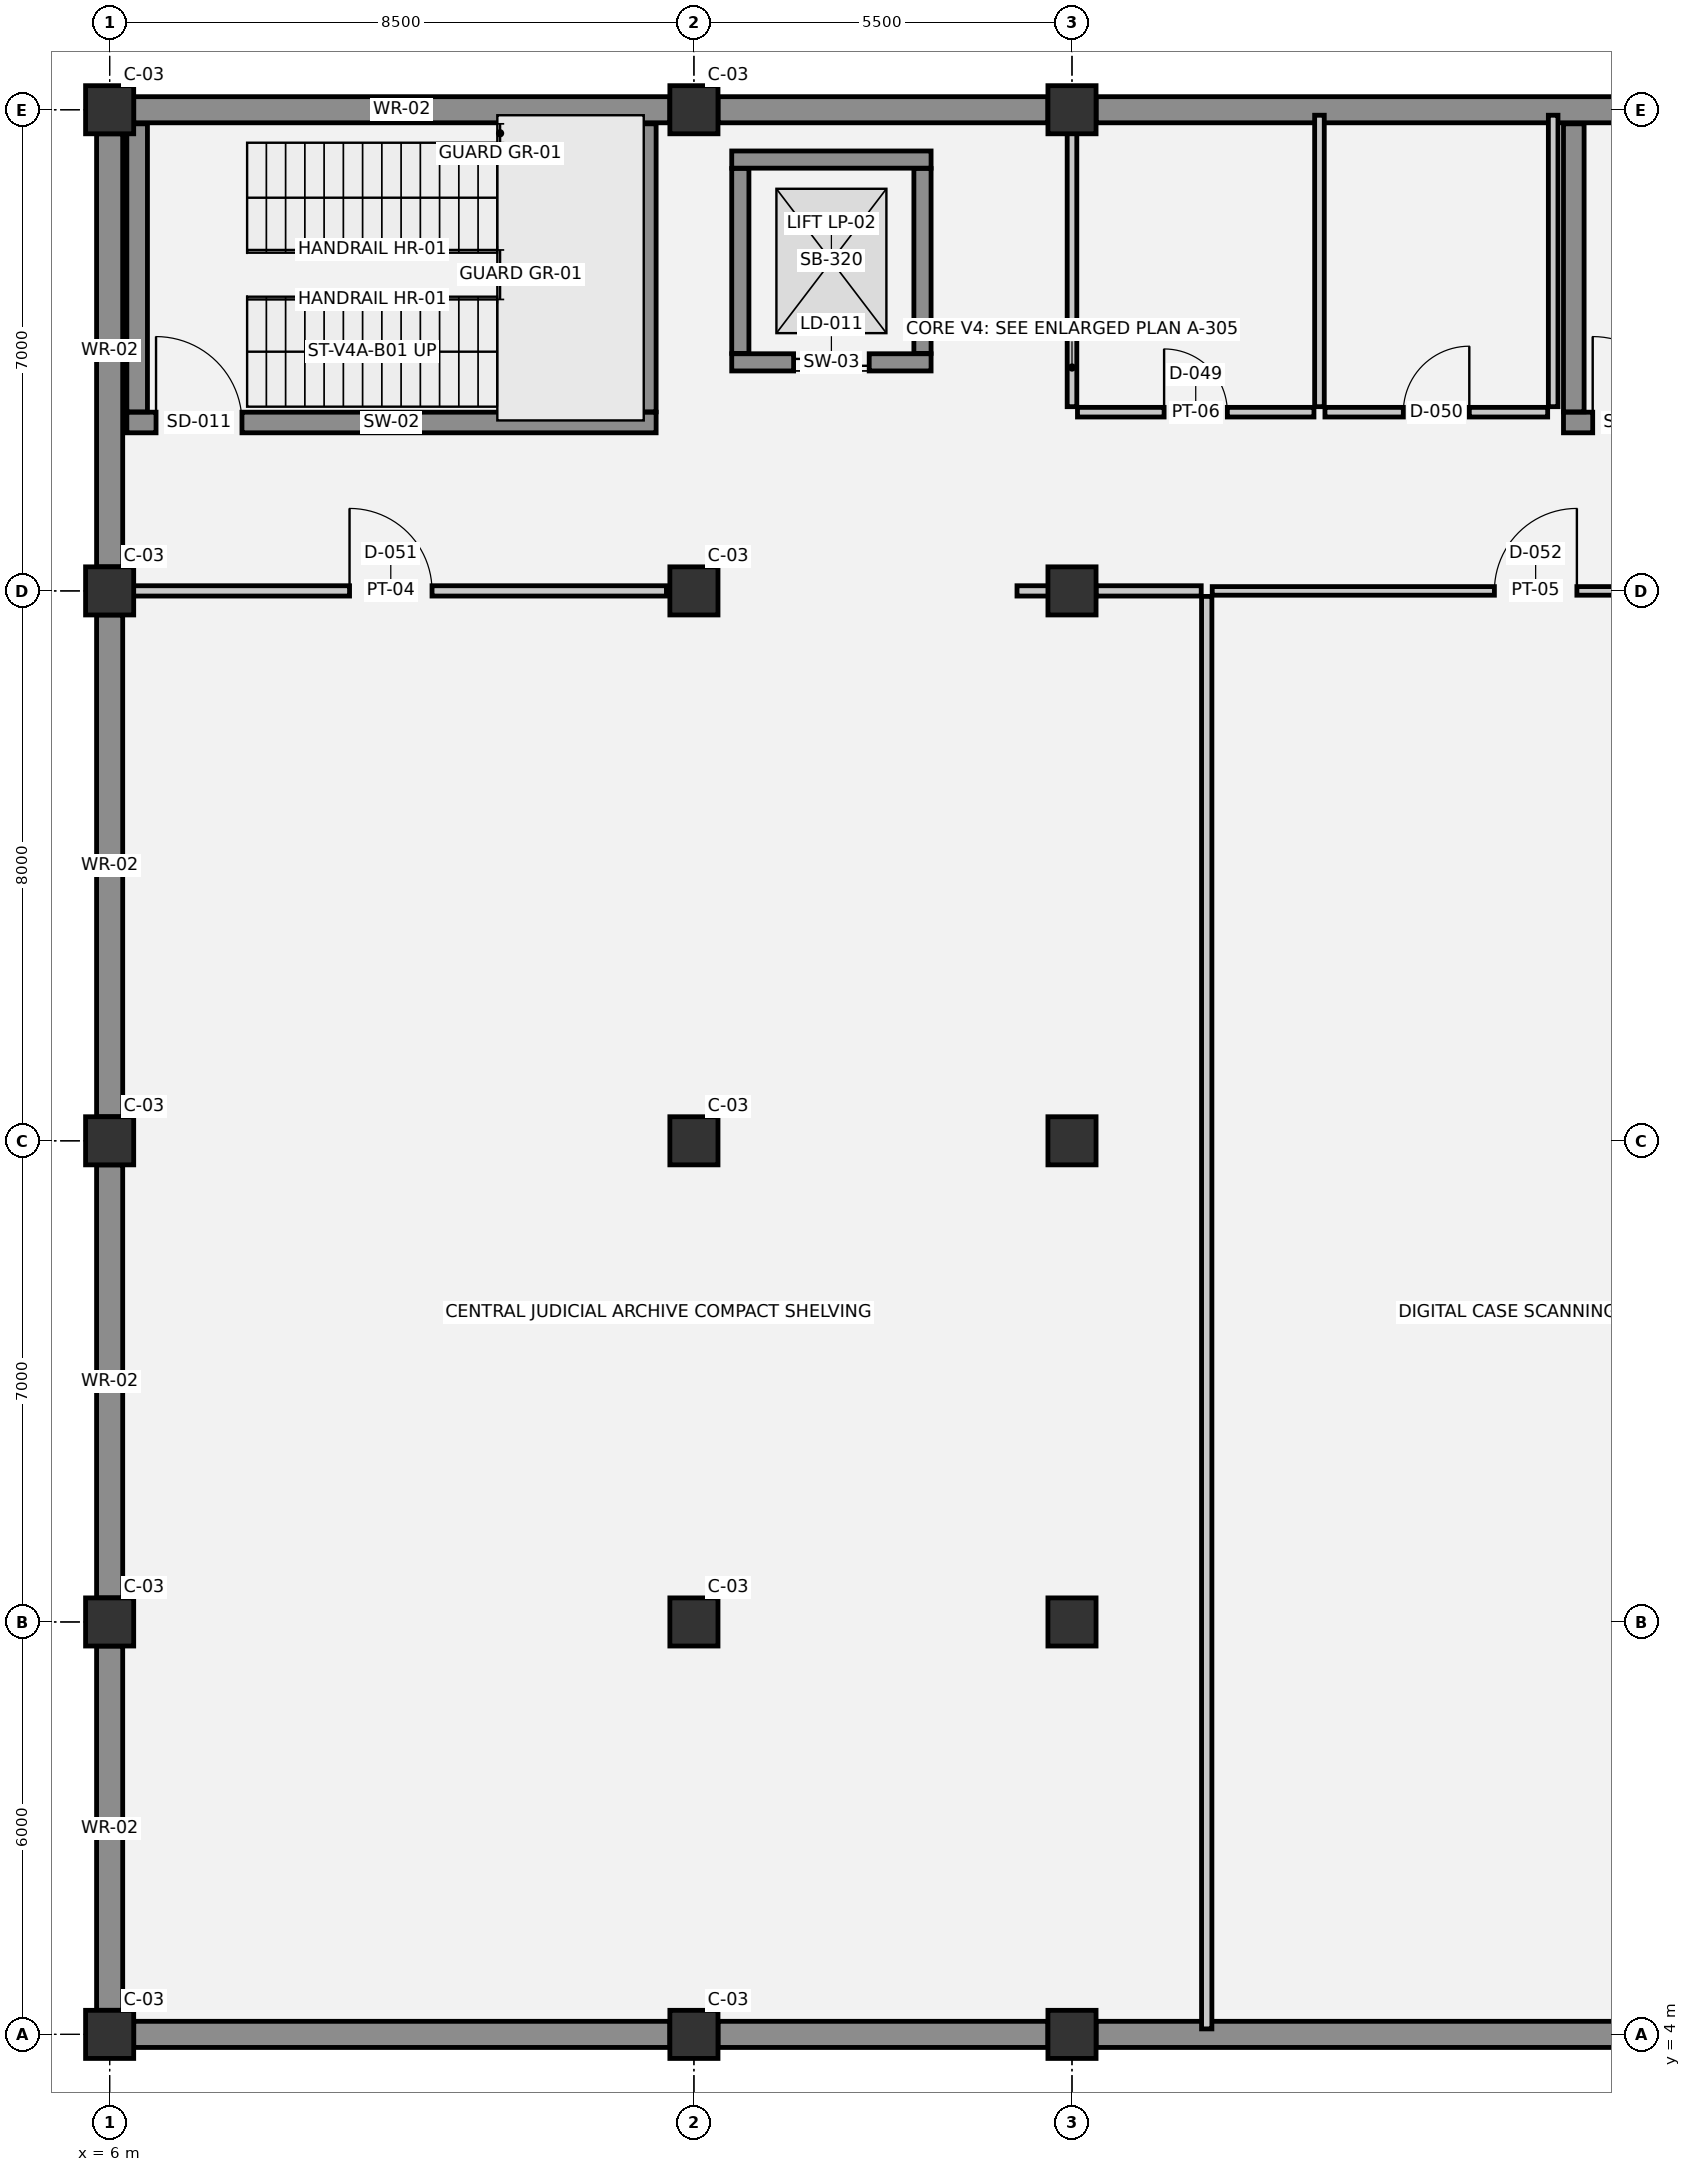
"""IFC4 building model, lengths in metres.
Left out: names, types, materials, properties, quantities, classifications, styles, units other than length and angle.
Written with IfcOpenShell. Run it as: python <this file> out.ifc"""

import sys

from ifc_helpers import new_model, si_unit, direction, frame, frame_2d, origin, origin_2d, place, context, subcontext, project, spatial, rectangle, extrude, element, fill, save


model = new_model("IFC4")
c1 = context("Model", 3, precision=1e-05, world=origin(), true_north=direction((0.0, 1.0)))
c2 = subcontext(c1, "Body", "Model", "MODEL_VIEW")
j1 = project(units=[si_unit("LENGTHUNIT", "METRE"), si_unit("PLANEANGLEUNIT", "RADIAN")], contexts=[c1])
p1 = place(None, origin())
s1 = spatial("IfcSite", under=j1, at=p1, CompositionType="ELEMENT")
p2 = place(p1, origin())
s2 = spatial("IfcBuilding", under=s1, at=p2, CompositionType="ELEMENT")
p3 = place(p2, frame((0.0, 0.0, -4.5)))
s3 = spatial("IfcBuildingStorey", under=s2, at=p3, CompositionType="ELEMENT", Elevation=-4.5)
for number, where, z_axis, x_axis in (
    (1, (6.0, 4.0, 0.0), (0.0, 0.0, 1.0), (1.0, 0.0, 0.0)),
    (2, (6.0, 10.0, 0.0), (0.0, 0.0, 1.0), (1.0, 0.0, 0.0)),
    (3, (6.0, 17.0, 0.0), (0.0, 0.0, 1.0), (1.0, 0.0, 0.0)),
    (4, (6.0, 25.0, 0.0), (0.0, 0.0, 1.0), (1.0, 0.0, 0.0)),
    (5, (6.0, 32.0, 0.0), (0.0, 0.0, 1.0), (1.0, 0.0, 0.0)),
    (6, (14.5, 4.0, 0.0), (0.0, 0.0, 1.0), (1.0, 0.0, 0.0)),
    (7, (14.5, 10.0, 0.0), (0.0, 0.0, 1.0), (1.0, 0.0, 0.0)),
    (8, (14.5, 17.0, 0.0), (0.0, 0.0, 1.0), (1.0, 0.0, 0.0)),
    (9, (14.5, 25.0, 0.0), (0.0, 0.0, 1.0), (1.0, 0.0, 0.0)),
    (10, (14.5, 32.0, 0.0), (0.0, 0.0, 1.0), (1.0, 0.0, 0.0)),
    (11, (20.0, 4.0, 0.0), (0.0, 0.0, 1.0), (1.0, 0.0, 0.0)),
    (12, (20.0, 10.0, 0.0), (0.0, 0.0, 1.0), (1.0, 0.0, 0.0)),
    (13, (20.0, 17.0, 0.0), (0.0, 0.0, 1.0), (1.0, 0.0, 0.0)),
    (14, (20.0, 25.0, 0.0), (0.0, 0.0, 1.0), (1.0, 0.0, 0.0)),
    (15, (20.0, 32.0, 0.0), (0.0, 0.0, 1.0), (1.0, 0.0, 0.0)),
):
    element("IfcColumn", number, at=place(p3, frame(where, z_axis=z_axis, x_axis=x_axis)), inside=s3, PredefinedType="COLUMN", context=c2, shape_type="SweptSolid", body=[
        extrude(rectangle(XDim=0.7, YDim=0.7, at=origin_2d()), origin(), (0.0, 0.0, 1.0), 4.5),
    ])
p4 = place(p3, frame((6.0, 4.35, 0.0), z_axis=(0.0, 0.0, 1.0), x_axis=(0.0, 1.0, 0.0)))
e16 = element("IfcWall", 16, at=p4, inside=s3, PredefinedType="STANDARD", context=c2, shape_type="SweptSolid", body=[
    extrude(rectangle(XDim=5.3, YDim=0.38, at=frame_2d((2.65, 0.0))), origin(), (0.0, 0.0, 1.0), 4.24),
])
p5 = place(p3, frame((6.0, 10.35, 0.0), z_axis=(0.0, 0.0, 1.0), x_axis=(0.0, 1.0, 0.0)))
e17 = element("IfcWall", 17, at=p5, inside=s3, PredefinedType="STANDARD", context=c2, shape_type="SweptSolid", body=[
    extrude(rectangle(XDim=6.3, YDim=0.38, at=frame_2d((3.15, 0.0))), origin(), (0.0, 0.0, 1.0), 4.24),
])
p6 = place(p3, frame((6.0, 17.35, 0.0), z_axis=(0.0, 0.0, 1.0), x_axis=(0.0, 1.0, 0.0)))
e18 = element("IfcWall", 18, at=p6, inside=s3, PredefinedType="STANDARD", context=c2, shape_type="SweptSolid", body=[
    extrude(rectangle(XDim=7.3, YDim=0.38, at=frame_2d((3.65, 0.0))), origin(), (0.0, 0.0, 1.0), 4.24),
])
p7 = place(p3, frame((6.0, 25.35, 0.0), z_axis=(0.0, 0.0, 1.0), x_axis=(0.0, 1.0, 0.0)))
e19 = element("IfcWall", 19, at=p7, inside=s3, PredefinedType="STANDARD", context=c2, shape_type="SweptSolid", body=[
    extrude(rectangle(XDim=6.3, YDim=0.38, at=frame_2d((3.15, 0.0))), origin(), (0.0, 0.0, 1.0), 4.24),
])
p8 = place(p3, frame((6.35, 32.0, 0.0), z_axis=(0.0, 0.0, 1.0), x_axis=(1.0, 0.0, 0.0)))
e20 = element("IfcWall", 20, at=p8, inside=s3, PredefinedType="STANDARD", context=c2, shape_type="SweptSolid", body=[
    extrude(rectangle(XDim=7.8, YDim=0.38, at=frame_2d((3.9, 0.0))), origin(), (0.0, 0.0, 1.0), 4.24),
])
p9 = place(p3, frame((14.85, 32.0, 0.0), z_axis=(0.0, 0.0, 1.0), x_axis=(1.0, 0.0, 0.0)))
e21 = element("IfcWall", 21, at=p9, inside=s3, PredefinedType="STANDARD", context=c2, shape_type="SweptSolid", body=[
    extrude(rectangle(XDim=4.8, YDim=0.38, at=frame_2d((2.4, 0.0))), origin(), (0.0, 0.0, 1.0), 4.24),
])
for number, where, z_axis, x_axis in (
    (22, (20.35, 32.0, 0.0), (0.0, 0.0, 1.0), (1.0, 0.0, 0.0)),
    (23, (34.65, 4.0, 0.0), (0.0, 0.0, 1.0), (-1.0, 0.0, 0.0)),
):
    element("IfcWall", number, at=place(p3, frame(where, z_axis=z_axis, x_axis=x_axis)), inside=s3, PredefinedType="STANDARD", context=c2, shape_type="SweptSolid", body=[
        extrude(rectangle(XDim=14.3, YDim=0.38, at=frame_2d((7.15, 0.0))), origin(), (0.0, 0.0, 1.0), 4.24),
    ])
p10 = place(p3, frame((19.65, 4.0, 0.0), z_axis=(0.0, 0.0, 1.0), x_axis=(-1.0, 0.0, 0.0)))
e24 = element("IfcWall", 24, at=p10, inside=s3, PredefinedType="STANDARD", context=c2, shape_type="SweptSolid", body=[
    extrude(rectangle(XDim=4.8, YDim=0.38, at=frame_2d((2.4, 0.0))), origin(), (0.0, 0.0, 1.0), 4.24),
])
p11 = place(p3, frame((14.15, 4.0, 0.0), z_axis=(0.0, 0.0, 1.0), x_axis=(-1.0, 0.0, 0.0)))
e25 = element("IfcWall", 25, at=p11, inside=s3, PredefinedType="STANDARD", context=c2, shape_type="SweptSolid", body=[
    extrude(rectangle(XDim=7.8, YDim=0.38, at=frame_2d((3.9, 0.0))), origin(), (0.0, 0.0, 1.0), 4.24),
])
p12 = place(p3, frame((15.05, 28.325, 0.0), z_axis=(0.0, 0.0, 1.0), x_axis=(1.0, 0.0, 0.0)))
e26 = element("IfcWall", 26, at=p12, inside=s3, PredefinedType="SHEAR", context=c2, shape_type="SweptSolid", body=[
    extrude(rectangle(XDim=2.9, YDim=0.25, at=frame_2d((1.45, 0.0))), origin(), (0.0, 0.0, 1.0), 4.5),
])
p13 = place(p12, frame((0.9, 0.0, 0.0)))
e27 = element("IfcOpeningElement", 27, at=p13, cuts=e26, PredefinedType="OPENING", context=c2, shape_type="SweptSolid", body=[
    extrude(rectangle(XDim=1.1, YDim=2.15, at=frame_2d((0.55, 1.075))), frame((0.0, 0.135, 0.0), z_axis=(0.0, -1.0, 0.0), x_axis=(1.0, 0.0, 0.0)), (0.0, 0.0, 1.0), 0.27),
])
p14 = place(p3, frame((17.95, 31.275, 0.0), z_axis=(0.0, 0.0, 1.0), x_axis=(-1.0, 0.0, 0.0)))
e28 = element("IfcWall", 28, at=p14, inside=s3, PredefinedType="SHEAR", context=c2, shape_type="SweptSolid", body=[
    extrude(rectangle(XDim=2.9, YDim=0.25, at=frame_2d((1.45, 0.0))), origin(), (0.0, 0.0, 1.0), 4.5),
])
for number, where, z_axis, x_axis in (
    (29, (15.175, 31.145, 0.0), (0.0, 0.0, 1.0), (0.0, -1.0, 0.0)),
    (30, (17.825, 28.455, 0.0), (0.0, 0.0, 1.0), (0.0, 1.0, 0.0)),
):
    element("IfcWall", number, at=place(p3, frame(where, z_axis=z_axis, x_axis=x_axis)), inside=s3, PredefinedType="SHEAR", context=c2, shape_type="SweptSolid", body=[
        extrude(rectangle(XDim=2.69, YDim=0.25, at=frame_2d((1.345, 0.0))), origin(), (0.0, 0.0, 1.0), 4.5),
    ])
p15 = place(p3, frame((6.25, 27.45, 0.0), z_axis=(0.0, 0.0, 1.0), x_axis=(1.0, 0.0, 0.0)))
e31 = element("IfcWall", 31, at=p15, inside=s3, PredefinedType="SHEAR", context=c2, shape_type="SweptSolid", body=[
    extrude(rectangle(XDim=7.7, YDim=0.3, at=frame_2d((3.85, 0.0))), origin(), (0.0, 0.0, 1.0), 4.24),
])
p16 = place(p15, frame((0.425, 0.0, 0.0)))
e32 = element("IfcOpeningElement", 32, at=p16, cuts=e31, PredefinedType="OPENING", context=c2, shape_type="SweptSolid", body=[
    extrude(rectangle(XDim=1.25, YDim=2.15, at=frame_2d((0.625, 1.075))), frame((0.0, 0.16, 0.0), z_axis=(0.0, -1.0, 0.0), x_axis=(1.0, 0.0, 0.0)), (0.0, 0.0, 1.0), 0.32),
])
for number, where, z_axis, x_axis in (
    (33, (6.4, 31.795, 0.0), (0.0, 0.0, 1.0), (0.0, -1.0, 0.0)),
    (34, (13.8, 27.605, 0.0), (0.0, 0.0, 1.0), (0.0, 1.0, 0.0)),
):
    element("IfcWall", number, at=place(p3, frame(where, z_axis=z_axis, x_axis=x_axis)), inside=s3, PredefinedType="SHEAR", context=c2, shape_type="SweptSolid", body=[
        extrude(rectangle(XDim=4.19, YDim=0.3, at=frame_2d((2.095, 0.0))), origin(), (0.0, 0.0, 1.0), 4.24),
    ])
p17 = place(p3, frame((27.15, 27.45, 0.0), z_axis=(0.0, 0.0, 1.0), x_axis=(1.0, 0.0, 0.0)))
e35 = element("IfcWall", 35, at=p17, inside=s3, PredefinedType="SHEAR", context=c2, shape_type="SweptSolid", body=[
    extrude(rectangle(XDim=7.7, YDim=0.3, at=frame_2d((3.85, 0.0))), origin(), (0.0, 0.0, 1.0), 4.24),
])
p18 = place(p17, frame((0.425, 0.0, 0.0)))
e36 = element("IfcOpeningElement", 36, at=p18, cuts=e35, PredefinedType="OPENING", context=c2, shape_type="SweptSolid", body=[
    extrude(rectangle(XDim=1.25, YDim=2.15, at=frame_2d((0.625, 1.075))), frame((0.0, 0.16, 0.0), z_axis=(0.0, -1.0, 0.0), x_axis=(1.0, 0.0, 0.0)), (0.0, 0.0, 1.0), 0.32),
])
p19 = place(p3, frame((27.3, 31.795, 0.0), z_axis=(0.0, 0.0, 1.0), x_axis=(0.0, -1.0, 0.0)))
e37 = element("IfcWall", 37, at=p19, inside=s3, PredefinedType="SHEAR", context=c2, shape_type="SweptSolid", body=[
    extrude(rectangle(XDim=4.19, YDim=0.3, at=frame_2d((2.095, 0.0))), origin(), (0.0, 0.0, 1.0), 4.24),
])
p20 = place(p3, frame((6.08, 25.0, 0.0), z_axis=(0.0, 0.0, 1.0), x_axis=(1.0, 0.0, 0.0)))
e38 = element("IfcWall", 38, at=p20, inside=s3, PredefinedType="PARTITIONING", context=c2, shape_type="SweptSolid", body=[
    extrude(rectangle(XDim=8.02, YDim=0.15, at=frame_2d((4.01, 0.0))), origin(), (0.0, 0.0, 1.0), 3.53),
])
p21 = place(p20, frame((3.41, 0.0, 0.0)))
e39 = element("IfcOpeningElement", 39, at=p21, cuts=e38, PredefinedType="OPENING", context=c2, shape_type="SweptSolid", body=[
    extrude(rectangle(XDim=1.2, YDim=2.15, at=frame_2d((0.6, 1.075))), frame((0.0, 0.085, 0.0), z_axis=(0.0, -1.0, 0.0), x_axis=(1.0, 0.0, 0.0)), (0.0, 0.0, 1.0), 0.17),
])
p22 = place(p3, frame((19.2, 25.0, 0.0), z_axis=(0.0, 0.0, 1.0), x_axis=(1.0, 0.0, 0.0)))
e40 = element("IfcWall", 40, at=p22, inside=s3, PredefinedType="PARTITIONING", context=c2, shape_type="SweptSolid", body=[
    extrude(rectangle(XDim=1.15, YDim=0.15, at=frame_2d((0.575, 0.0))), origin(), (0.0, 0.0, 1.0), 4.14),
])
p23 = place(p3, frame((20.35, 25.0, 0.0), z_axis=(0.0, 0.0, 1.0), x_axis=(1.0, 0.0, 0.0)))
e41 = element("IfcWall", 41, at=p23, inside=s3, PredefinedType="PARTITIONING", context=c2, shape_type="SweptSolid", body=[
    extrude(rectangle(XDim=1.53, YDim=0.15, at=frame_2d((0.765, 0.0))), origin(), (0.0, 0.0, 1.0), 3.28),
])
p24 = place(p3, frame((22.04, 25.0, 0.0), z_axis=(0.0, 0.0, 1.0), x_axis=(1.0, 0.0, 0.0)))
e42 = element("IfcWall", 42, at=p24, inside=s3, PredefinedType="PARTITIONING", context=c2, shape_type="SweptSolid", body=[
    extrude(rectangle(XDim=9.41, YDim=0.125, at=frame_2d((4.705, 0.0))), origin(), (0.0, 0.0, 1.0), 3.28),
])
p25 = place(p24, frame((4.105, 0.0, 0.0)))
e43 = element("IfcOpeningElement", 43, at=p25, cuts=e42, PredefinedType="OPENING", context=c2, shape_type="SweptSolid", body=[
    extrude(rectangle(XDim=1.2, YDim=2.15, at=frame_2d((0.6, 1.075))), frame((0.0, 0.073, 0.0), z_axis=(0.0, -1.0, 0.0), x_axis=(1.0, 0.0, 0.0)), (0.0, 0.0, 1.0), 0.145),
])
p26 = place(p3, frame((20.08, 27.6, 0.0), z_axis=(0.0, 0.0, 1.0), x_axis=(1.0, 0.0, 0.0)))
e44 = element("IfcWall", 44, at=p26, inside=s3, PredefinedType="PLUMBINGWALL", context=c2, shape_type="SweptSolid", body=[
    extrude(rectangle(XDim=3.44, YDim=0.14, at=frame_2d((1.72, 0.0))), origin(), (0.0, 0.0, 1.0), 4.14),
])
p27 = place(p26, frame((1.26, 0.0, 0.0)))
e45 = element("IfcOpeningElement", 45, at=p27, cuts=e44, PredefinedType="OPENING", context=c2, shape_type="SweptSolid", body=[
    extrude(rectangle(XDim=0.92, YDim=2.1, at=frame_2d((0.46, 1.05))), frame((0.0, 0.08, 0.0), z_axis=(0.0, -1.0, 0.0), x_axis=(1.0, 0.0, 0.0)), (0.0, 0.0, 1.0), 0.16),
])
p28 = place(p3, frame((23.68, 27.6, 0.0), z_axis=(0.0, 0.0, 1.0), x_axis=(1.0, 0.0, 0.0)))
e46 = element("IfcWall", 46, at=p28, inside=s3, PredefinedType="PLUMBINGWALL", context=c2, shape_type="SweptSolid", body=[
    extrude(rectangle(XDim=3.24, YDim=0.14, at=frame_2d((1.62, 0.0))), origin(), (0.0, 0.0, 1.0), 4.14),
])
p29 = place(p28, frame((1.14, 0.0, 0.0)))
e47 = element("IfcOpeningElement", 47, at=p29, cuts=e46, PredefinedType="OPENING", context=c2, shape_type="SweptSolid", body=[
    extrude(rectangle(XDim=0.96, YDim=2.1, at=frame_2d((0.48, 1.05))), frame((0.0, 0.08, 0.0), z_axis=(0.0, -1.0, 0.0), x_axis=(1.0, 0.0, 0.0)), (0.0, 0.0, 1.0), 0.16),
])
p30 = place(p3, frame((20.0, 27.68, 0.0), z_axis=(0.0, 0.0, 1.0), x_axis=(0.0, 1.0, 0.0)))
e48 = element("IfcWall", 48, at=p30, inside=s3, PredefinedType="PLUMBINGWALL", context=c2, shape_type="SweptSolid", body=[
    extrude(rectangle(XDim=4.24, YDim=0.14, at=frame_2d((2.12, 0.0))), origin(), (0.0, 0.0, 1.0), 3.68),
])
p31 = place(p3, frame((21.96, 4.08, 0.0), z_axis=(0.0, 0.0, 1.0), x_axis=(0.0, 1.0, 0.0)))
e49 = element("IfcWall", 49, at=p31, inside=s3, PredefinedType="PARTITIONING", context=c2, shape_type="SweptSolid", body=[
    extrude(rectangle(XDim=20.84, YDim=0.15, at=frame_2d((10.42, 0.0))), origin(), (0.0, 0.0, 1.0), 4.14),
])
for number, where, z_axis, x_axis in (
    (50, (23.6, 27.68, 0.0), (0.0, 0.0, 1.0), (0.0, 1.0, 0.0)),
    (51, (27.0, 27.68, 0.0), (0.0, 0.0, 1.0), (0.0, 1.0, 0.0)),
):
    element("IfcWall", number, at=place(p3, frame(where, z_axis=z_axis, x_axis=x_axis)), inside=s3, PredefinedType="PLUMBINGWALL", context=c2, shape_type="SweptSolid", body=[
        extrude(rectangle(XDim=4.24, YDim=0.14, at=frame_2d((2.12, 0.0))), origin(), (0.0, 0.0, 1.0), 4.14),
    ])
p32 = place(p13, origin())
e52 = element("IfcDoor", 52, at=p32, inside=s3, OperationType="DOUBLE_DOOR_SLIDING", PredefinedType="DOOR", context=c2, shape_type="SweptSolid", body=[
    extrude(rectangle(XDim=1.1, YDim=2.15, at=frame_2d((0.55, 1.075))), frame((0.0, 0.025, 0.0), z_axis=(0.0, -1.0, 0.0), x_axis=(1.0, 0.0, 0.0)), (0.0, 0.0, 1.0), 0.05),
])
fill(e27, e52)
p33 = place(p16, origin())
e53 = element("IfcDoor", 53, at=p33, inside=s3, OperationType="SINGLE_SWING_LEFT", PredefinedType="DOOR", context=c2, shape_type="SweptSolid", body=[
    extrude(rectangle(XDim=1.25, YDim=2.15, at=frame_2d((0.625, 1.075))), frame((0.0, 0.025, 0.0), z_axis=(0.0, -1.0, 0.0), x_axis=(1.0, 0.0, 0.0)), (0.0, 0.0, 1.0), 0.05),
])
fill(e32, e53)
p34 = place(p18, origin())
e54 = element("IfcDoor", 54, at=p34, inside=s3, OperationType="SINGLE_SWING_LEFT", PredefinedType="DOOR", context=c2, shape_type="SweptSolid", body=[
    extrude(rectangle(XDim=1.25, YDim=2.15, at=frame_2d((0.625, 1.075))), frame((0.0, 0.025, 0.0), z_axis=(0.0, -1.0, 0.0), x_axis=(1.0, 0.0, 0.0)), (0.0, 0.0, 1.0), 0.05),
])
fill(e36, e54)
p35 = place(p27, origin())
e55 = element("IfcDoor", 55, at=p35, inside=s3, OperationType="SINGLE_SWING_LEFT", PredefinedType="DOOR", context=c2, shape_type="SweptSolid", body=[
    extrude(rectangle(XDim=0.92, YDim=2.1, at=frame_2d((0.46, 1.05))), frame((0.0, 0.025, 0.0), z_axis=(0.0, -1.0, 0.0), x_axis=(1.0, 0.0, 0.0)), (0.0, 0.0, 1.0), 0.05),
])
fill(e45, e55)
p36 = place(p29, origin())
e56 = element("IfcDoor", 56, at=p36, inside=s3, OperationType="SINGLE_SWING_RIGHT", PredefinedType="DOOR", context=c2, shape_type="SweptSolid", body=[
    extrude(rectangle(XDim=0.96, YDim=2.1, at=frame_2d((0.48, 1.05))), frame((0.0, 0.025, 0.0), z_axis=(0.0, -1.0, 0.0), x_axis=(1.0, 0.0, 0.0)), (0.0, 0.0, 1.0), 0.05),
])
fill(e47, e56)
p37 = place(p21, origin())
e57 = element("IfcDoor", 57, at=p37, inside=s3, OperationType="SINGLE_SWING_LEFT", PredefinedType="DOOR", context=c2, shape_type="SweptSolid", body=[
    extrude(rectangle(XDim=1.2, YDim=2.15, at=frame_2d((0.6, 1.075))), frame((0.0, 0.025, 0.0), z_axis=(0.0, -1.0, 0.0), x_axis=(1.0, 0.0, 0.0)), (0.0, 0.0, 1.0), 0.05),
])
fill(e39, e57)
p38 = place(p25, origin())
e58 = element("IfcDoor", 58, at=p38, inside=s3, OperationType="SINGLE_SWING_RIGHT", PredefinedType="DOOR", context=c2, shape_type="SweptSolid", body=[
    extrude(rectangle(XDim=1.2, YDim=2.15, at=frame_2d((0.6, 1.075))), frame((0.0, 0.025, 0.0), z_axis=(0.0, -1.0, 0.0), x_axis=(1.0, 0.0, 0.0)), (0.0, 0.0, 1.0), 0.05),
])
fill(e43, e58)
save(model, sys.argv[1])
